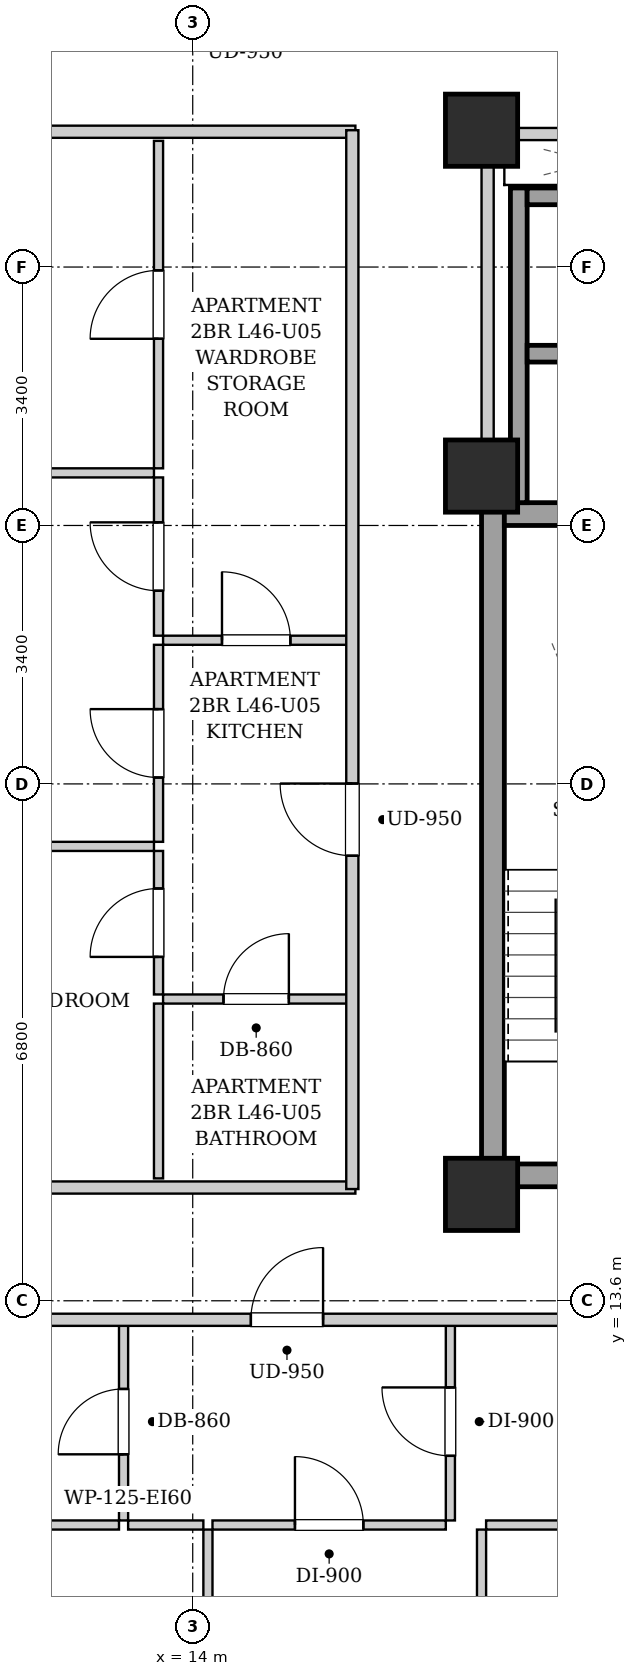
"""IFC4 building model, lengths in metres.
Left out: names, types, materials, properties, quantities, classifications, styles, units other than length and angle.
Written with IfcOpenShell. Run it as: python <this file> out.ifc"""

import sys

from ifc_helpers import new_model, si_unit, direction, frame, frame_2d, origin, origin_2d, place, context, subcontext, project, spatial, rectangle, extrude, element, fill, save


model = new_model("IFC4")
c1 = context("Model", 3, precision=1e-05, world=origin(), true_north=direction((0.0, 1.0)))
c2 = subcontext(c1, "Body", "Model", "MODEL_VIEW")
j1 = project(units=[si_unit("LENGTHUNIT", "METRE"), si_unit("PLANEANGLEUNIT", "RADIAN")], contexts=[c1])
p1 = place(None, origin())
s1 = spatial("IfcSite", under=j1, at=p1, CompositionType="ELEMENT")
p2 = place(p1, origin())
s2 = spatial("IfcBuilding", under=s1, at=p2, CompositionType="ELEMENT")
p3 = place(p2, frame((0.0, 0.0, 160.15)))
s3 = spatial("IfcBuildingStorey", under=s2, at=p3, CompositionType="ELEMENT", Elevation=160.15)
for number, where, z_axis, x_axis in (
    (1, (17.8, 15.0, 0.0), (0.0, 0.0, 1.0), (1.0, 0.0, 0.0)),
    (2, (17.8, 29.0, 0.0), (0.0, 0.0, 1.0), (1.0, 0.0, 0.0)),
    (3, (17.8, 24.45, 0.0), (0.0, 0.0, 1.0), (1.0, 0.0, 0.0)),
):
    element("IfcColumn", number, at=place(p3, frame(where, z_axis=z_axis, x_axis=x_axis)), inside=s3, PredefinedType="COLUMN", context=c2, shape_type="SweptSolid", body=[
        extrude(rectangle(XDim=0.95, YDim=0.95, at=origin_2d()), origin(), (0.0, 0.0, 1.0), 3.25),
    ])
p4 = place(p3, frame((17.95, 15.1, 0.0), z_axis=(0.0, 0.0, 1.0), x_axis=(0.0, 1.0, 0.0)))
e4 = element("IfcWall", 4, at=p4, inside=s3, PredefinedType="SHEAR", context=c2, shape_type="SweptSolid", body=[
    extrude(rectangle(XDim=9.0, YDim=0.3, at=frame_2d((4.5, 0.0))), origin(), (0.0, 0.0, 1.0), 2.99),
])
p5 = place(p3, frame((18.1, 23.95, 0.0), z_axis=(0.0, 0.0, 1.0), x_axis=(1.0, 0.0, 0.0)))
e5 = element("IfcWall", 5, at=p5, inside=s3, PredefinedType="SHEAR", context=c2, shape_type="SweptSolid", body=[
    extrude(rectangle(XDim=2.85, YDim=0.3, at=frame_2d((1.425, 0.0))), origin(), (0.0, 0.0, 1.0), 2.99),
])
p6 = place(p3, frame((18.1, 15.25, 0.0), z_axis=(0.0, 0.0, 1.0), x_axis=(1.0, 0.0, 0.0)))
e6 = element("IfcWall", 6, at=p6, inside=s3, PredefinedType="SHEAR", context=c2, shape_type="SweptSolid", body=[
    extrude(rectangle(XDim=2.85, YDim=0.3, at=frame_2d((1.425, 0.0))), origin(), (0.0, 0.0, 1.0), 2.99),
])
p7 = place(p6, frame((0.86, 0.0, 0.0)))
e7 = element("IfcOpeningElement", 7, at=p7, cuts=e6, PredefinedType="OPENING", context=c2, shape_type="SweptSolid", body=[
    extrude(rectangle(XDim=1.1, YDim=2.05, at=frame_2d((0.55, 1.025))), frame((0.0, 0.16, 0.0), z_axis=(0.0, -1.0, 0.0), x_axis=(1.0, 0.0, 0.0)), (0.0, 0.0, 1.0), 0.32),
])
p8 = place(p3, frame((18.29, 24.1, 0.0), z_axis=(0.0, 0.0, 1.0), x_axis=(0.0, 1.0, 0.0)))
e8 = element("IfcWall", 8, at=p8, inside=s3, PredefinedType="SHEAR", context=c2, shape_type="SweptSolid", body=[
    extrude(rectangle(XDim=4.14, YDim=0.22, at=frame_2d((2.07, 0.0))), origin(), (0.0, 0.0, 1.0), 2.99),
])
for number, where, z_axis, x_axis in (
    (9, (18.4, 26.06, 0.0), (0.0, 0.0, 1.0), (1.0, 0.0, 0.0)),
    (10, (18.4, 28.13, 0.0), (0.0, 0.0, 1.0), (1.0, 0.0, 0.0)),
):
    element("IfcWall", number, at=place(p3, frame(where, z_axis=z_axis, x_axis=x_axis)), inside=s3, PredefinedType="SHEAR", context=c2, shape_type="SweptSolid", body=[
        extrude(rectangle(XDim=1.9, YDim=0.22, at=frame_2d((0.95, 0.0))), origin(), (0.0, 0.0, 1.0), 2.99),
    ])
p9 = place(p3, frame((17.88, 24.12, 0.0), z_axis=(0.0, 0.0, 1.0), x_axis=(0.0, 1.0, 0.0)))
e11 = element("IfcWall", 11, at=p9, inside=s3, PredefinedType="PARTITIONING", context=c2, shape_type="SweptSolid", body=[
    extrude(rectangle(XDim=4.76, YDim=0.16, at=frame_2d((2.38, 0.0))), origin(), (0.0, 0.0, 1.0), 2.99),
])
p10 = place(p3, frame((17.96, 28.95, 0.0), z_axis=(0.0, 0.0, 1.0), x_axis=(1.0, 0.0, 0.0)))
e12 = element("IfcWall", 12, at=p10, inside=s3, PredefinedType="PARTITIONING", context=c2, shape_type="SweptSolid", body=[
    extrude(rectangle(XDim=4.29, YDim=0.16, at=frame_2d((2.145, 0.0))), origin(), (0.0, 0.0, 1.0), 2.442),
])
p11 = place(p10, frame((1.695, 0.0, 0.0)))
e13 = element("IfcOpeningElement", 13, at=p11, cuts=e12, PredefinedType="OPENING", context=c2, shape_type="SweptSolid", body=[
    extrude(rectangle(XDim=0.86, YDim=2.05, at=frame_2d((0.43, 1.025))), frame((0.0, 0.09, 0.0), z_axis=(0.0, -1.0, 0.0), x_axis=(1.0, 0.0, 0.0)), (0.0, 0.0, 1.0), 0.18),
])
for number, where, z_axis, x_axis in (
    (14, (7.78, 15.09, 0.0), (0.0, 0.0, 1.0), (1.0, 0.0, 0.0)),
    (15, (7.78, 28.98, 0.0), (0.0, 0.0, 1.0), (1.0, 0.0, 0.0)),
):
    element("IfcWall", number, at=place(p3, frame(where, z_axis=z_axis, x_axis=x_axis)), inside=s3, PredefinedType="PARTITIONING", context=c2, shape_type="SweptSolid", body=[
        extrude(rectangle(XDim=8.36, YDim=0.16, at=frame_2d((4.18, 0.0))), origin(), (0.0, 0.0, 1.0), 2.442),
    ])
p12 = place(p3, frame((13.09, 10.71, 0.0), z_axis=(0.0, 0.0, 1.0), x_axis=(0.0, 1.0, 0.0)))
e16 = element("IfcWall", 16, at=p12, inside=s3, PredefinedType="PARTITIONING", context=c2, shape_type="SweptSolid", body=[
    extrude(rectangle(XDim=2.6, YDim=0.12, at=frame_2d((1.3, 0.0))), origin(), (0.0, 0.0, 1.0), 2.99),
])
p13 = place(p12, frame((0.87, 0.0, 0.0)))
e17 = element("IfcOpeningElement", 17, at=p13, cuts=e16, PredefinedType="OPENING", context=c2, shape_type="SweptSolid", body=[
    extrude(rectangle(XDim=0.86, YDim=2.05, at=frame_2d((0.43, 1.025))), frame((0.0, 0.07, 0.0), z_axis=(0.0, -1.0, 0.0), x_axis=(1.0, 0.0, 0.0)), (0.0, 0.0, 1.0), 0.14),
])
p14 = place(p3, frame((10.63, 10.65, 0.0), z_axis=(0.0, 0.0, 1.0), x_axis=(1.0, 0.0, 0.0)))
e18 = element("IfcWall", 18, at=p14, inside=s3, PredefinedType="PARTITIONING", context=c2, shape_type="SweptSolid", body=[
    extrude(rectangle(XDim=2.4, YDim=0.12, at=frame_2d((1.2, 0.0))), origin(), (0.0, 0.0, 1.0), 2.99),
])
p15 = place(p3, frame((17.39, 10.71, 0.0), z_axis=(0.0, 0.0, 1.0), x_axis=(0.0, 1.0, 0.0)))
e19 = element("IfcWall", 19, at=p15, inside=s3, PredefinedType="PARTITIONING", context=c2, shape_type="SweptSolid", body=[
    extrude(rectangle(XDim=2.6, YDim=0.12, at=frame_2d((1.3, 0.0))), origin(), (0.0, 0.0, 1.0), 2.99),
])
p16 = place(p15, frame((0.85, 0.0, 0.0)))
e20 = element("IfcOpeningElement", 20, at=p16, cuts=e19, PredefinedType="OPENING", context=c2, shape_type="SweptSolid", body=[
    extrude(rectangle(XDim=0.9, YDim=2.05, at=frame_2d((0.45, 1.025))), frame((0.0, 0.07, 0.0), z_axis=(0.0, -1.0, 0.0), x_axis=(1.0, 0.0, 0.0)), (0.0, 0.0, 1.0), 0.14),
])
p17 = place(p3, frame((13.15, 10.65, 0.0), z_axis=(0.0, 0.0, 1.0), x_axis=(1.0, 0.0, 0.0)))
e21 = element("IfcWall", 21, at=p17, inside=s3, PredefinedType="PARTITIONING", context=c2, shape_type="SweptSolid", body=[
    extrude(rectangle(XDim=0.99, YDim=0.12, at=frame_2d((0.495, 0.0))), origin(), (0.0, 0.0, 1.0), 2.99),
])
p18 = place(p3, frame((14.26, 10.65, 0.0), z_axis=(0.0, 0.0, 1.0), x_axis=(1.0, 0.0, 0.0)))
e22 = element("IfcWall", 22, at=p18, inside=s3, PredefinedType="PARTITIONING", context=c2, shape_type="SweptSolid", body=[
    extrude(rectangle(XDim=3.07, YDim=0.12, at=frame_2d((1.535, 0.0))), origin(), (0.0, 0.0, 1.0), 2.99),
])
p19 = place(p18, frame((1.085, 0.0, 0.0)))
e23 = element("IfcOpeningElement", 23, at=p19, cuts=e22, PredefinedType="OPENING", context=c2, shape_type="SweptSolid", body=[
    extrude(rectangle(XDim=0.9, YDim=2.05, at=frame_2d((0.45, 1.025))), frame((0.0, 0.07, 0.0), z_axis=(0.0, -1.0, 0.0), x_axis=(1.0, 0.0, 0.0)), (0.0, 0.0, 1.0), 0.14),
])
p20 = place(p3, frame((17.86, 10.65, 0.0), z_axis=(0.0, 0.0, 1.0), x_axis=(1.0, 0.0, 0.0)))
e24 = element("IfcWall", 24, at=p20, inside=s3, PredefinedType="PARTITIONING", context=c2, shape_type="SweptSolid", body=[
    extrude(rectangle(XDim=3.948, YDim=0.12, at=frame_2d((1.974, 0.0))), origin(), (0.0, 0.0, 1.0), 2.99),
])
p21 = place(p20, frame((1.524, 0.0, 0.0)))
e25 = element("IfcOpeningElement", 25, at=p21, cuts=e24, PredefinedType="OPENING", context=c2, shape_type="SweptSolid", body=[
    extrude(rectangle(XDim=0.9, YDim=2.05, at=frame_2d((0.45, 1.025))), frame((0.0, 0.07, 0.0), z_axis=(0.0, -1.0, 0.0), x_axis=(1.0, 0.0, 0.0)), (0.0, 0.0, 1.0), 0.14),
])
p22 = place(p3, frame((14.2, 6.23, 0.0), z_axis=(0.0, 0.0, 1.0), x_axis=(0.0, 1.0, 0.0)))
e26 = element("IfcWall", 26, at=p22, inside=s3, PredefinedType="PARTITIONING", context=c2, shape_type="SweptSolid", body=[
    extrude(rectangle(XDim=4.36, YDim=0.12, at=frame_2d((2.18, 0.0))), origin(), (0.0, 0.0, 1.0), 2.99),
])
p23 = place(p22, frame((1.73, 0.0, 0.0)))
e27 = element("IfcOpeningElement", 27, at=p23, cuts=e26, PredefinedType="OPENING", context=c2, shape_type="SweptSolid", body=[
    extrude(rectangle(XDim=0.9, YDim=2.05, at=frame_2d((0.45, 1.025))), frame((0.0, 0.07, 0.0), z_axis=(0.0, -1.0, 0.0), x_axis=(1.0, 0.0, 0.0)), (0.0, 0.0, 1.0), 0.14),
])
p24 = place(p3, frame((17.8, 4.08, 0.0), z_axis=(0.0, 0.0, 1.0), x_axis=(0.0, 1.0, 0.0)))
e28 = element("IfcWall", 28, at=p24, inside=s3, PredefinedType="PARTITIONING", context=c2, shape_type="SweptSolid", body=[
    extrude(rectangle(XDim=6.51, YDim=0.12, at=frame_2d((3.255, 0.0))), origin(), (0.0, 0.0, 1.0), 2.442),
])
p25 = place(p24, frame((2.79, 0.0, 0.0)))
e29 = element("IfcOpeningElement", 29, at=p25, cuts=e28, PredefinedType="OPENING", context=c2, shape_type="SweptSolid", body=[
    extrude(rectangle(XDim=0.9, YDim=2.05, at=frame_2d((0.45, 1.025))), frame((0.0, 0.07, 0.0), z_axis=(0.0, -1.0, 0.0), x_axis=(1.0, 0.0, 0.0)), (0.0, 0.0, 1.0), 0.14),
])
p26 = place(p3, frame((13.61, 22.29, 0.0), z_axis=(0.0, 0.0, 1.0), x_axis=(1.0, 0.0, 0.0)))
e30 = element("IfcWall", 30, at=p26, inside=s3, PredefinedType="PARTITIONING", context=c2, shape_type="SweptSolid", body=[
    extrude(rectangle(XDim=2.45, YDim=0.12, at=frame_2d((1.225, 0.0))), origin(), (0.0, 0.0, 1.0), 2.99),
])
p27 = place(p26, frame((0.775, 0.0, 0.0)))
e31 = element("IfcOpeningElement", 31, at=p27, cuts=e30, PredefinedType="OPENING", context=c2, shape_type="SweptSolid", body=[
    extrude(rectangle(XDim=0.9, YDim=2.05, at=frame_2d((0.45, 1.025))), frame((0.0, 0.07, 0.0), z_axis=(0.0, -1.0, 0.0), x_axis=(1.0, 0.0, 0.0)), (0.0, 0.0, 1.0), 0.14),
])
p28 = place(p3, frame((13.55, 22.35, 0.0), z_axis=(0.0, 0.0, 1.0), x_axis=(0.0, 1.0, 0.0)))
e32 = element("IfcWall", 32, at=p28, inside=s3, PredefinedType="PARTITIONING", context=c2, shape_type="SweptSolid", body=[
    extrude(rectangle(XDim=2.082, YDim=0.12, at=frame_2d((1.041, 0.0))), origin(), (0.0, 0.0, 1.0), 2.99),
])
p29 = place(p28, frame((0.591, 0.0, 0.0)))
e33 = element("IfcOpeningElement", 33, at=p29, cuts=e32, PredefinedType="OPENING", context=c2, shape_type="SweptSolid", body=[
    extrude(rectangle(XDim=0.9, YDim=2.05, at=frame_2d((0.45, 1.025))), frame((0.0, 0.07, 0.0), z_axis=(0.0, -1.0, 0.0), x_axis=(1.0, 0.0, 0.0)), (0.0, 0.0, 1.0), 0.14),
])
p30 = place(p3, frame((13.55, 24.552, 0.0), z_axis=(0.0, 0.0, 1.0), x_axis=(0.0, 1.0, 0.0)))
e34 = element("IfcWall", 34, at=p30, inside=s3, PredefinedType="PARTITIONING", context=c2, shape_type="SweptSolid", body=[
    extrude(rectangle(XDim=4.308, YDim=0.12, at=frame_2d((2.154, 0.0))), origin(), (0.0, 0.0, 1.0), 2.99),
])
p31 = place(p30, frame((1.704, 0.0, 0.0)))
e35 = element("IfcOpeningElement", 35, at=p31, cuts=e34, PredefinedType="OPENING", context=c2, shape_type="SweptSolid", body=[
    extrude(rectangle(XDim=0.9, YDim=2.05, at=frame_2d((0.45, 1.025))), frame((0.0, 0.07, 0.0), z_axis=(0.0, -1.0, 0.0), x_axis=(1.0, 0.0, 0.0)), (0.0, 0.0, 1.0), 0.14),
])
p32 = place(p3, frame((13.61, 17.57, 0.0), z_axis=(0.0, 0.0, 1.0), x_axis=(1.0, 0.0, 0.0)))
e36 = element("IfcWall", 36, at=p32, inside=s3, PredefinedType="PARTITIONING", context=c2, shape_type="SweptSolid", body=[
    extrude(rectangle(XDim=2.45, YDim=0.12, at=frame_2d((1.225, 0.0))), origin(), (0.0, 0.0, 1.0), 2.99),
])
p33 = place(p32, frame((0.795, 0.0, 0.0)))
e37 = element("IfcOpeningElement", 37, at=p33, cuts=e36, PredefinedType="OPENING", context=c2, shape_type="SweptSolid", body=[
    extrude(rectangle(XDim=0.86, YDim=2.05, at=frame_2d((0.43, 1.025))), frame((0.0, 0.07, 0.0), z_axis=(0.0, -1.0, 0.0), x_axis=(1.0, 0.0, 0.0)), (0.0, 0.0, 1.0), 0.14),
])
p34 = place(p3, frame((13.55, 15.21, 0.0), z_axis=(0.0, 0.0, 1.0), x_axis=(0.0, 1.0, 0.0)))
e38 = element("IfcWall", 38, at=p34, inside=s3, PredefinedType="PARTITIONING", context=c2, shape_type="SweptSolid", body=[
    extrude(rectangle(XDim=2.3, YDim=0.12, at=frame_2d((1.15, 0.0))), origin(), (0.0, 0.0, 1.0), 2.99),
])
p35 = place(p3, frame((13.55, 17.63, 0.0), z_axis=(0.0, 0.0, 1.0), x_axis=(0.0, 1.0, 0.0)))
e39 = element("IfcWall", 39, at=p35, inside=s3, PredefinedType="PARTITIONING", context=c2, shape_type="SweptSolid", body=[
    extrude(rectangle(XDim=1.888, YDim=0.12, at=frame_2d((0.944, 0.0))), origin(), (0.0, 0.0, 1.0), 2.99),
])
p36 = place(p35, frame((0.494, 0.0, 0.0)))
e40 = element("IfcOpeningElement", 40, at=p36, cuts=e39, PredefinedType="OPENING", context=c2, shape_type="SweptSolid", body=[
    extrude(rectangle(XDim=0.9, YDim=2.05, at=frame_2d((0.45, 1.025))), frame((0.0, 0.07, 0.0), z_axis=(0.0, -1.0, 0.0), x_axis=(1.0, 0.0, 0.0)), (0.0, 0.0, 1.0), 0.14),
])
p37 = place(p3, frame((13.55, 19.638, 0.0), z_axis=(0.0, 0.0, 1.0), x_axis=(0.0, 1.0, 0.0)))
e41 = element("IfcWall", 41, at=p37, inside=s3, PredefinedType="PARTITIONING", context=c2, shape_type="SweptSolid", body=[
    extrude(rectangle(XDim=2.592, YDim=0.12, at=frame_2d((1.296, 0.0))), origin(), (0.0, 0.0, 1.0), 2.99),
])
p38 = place(p37, frame((0.846, 0.0, 0.0)))
e42 = element("IfcOpeningElement", 42, at=p38, cuts=e41, PredefinedType="OPENING", context=c2, shape_type="SweptSolid", body=[
    extrude(rectangle(XDim=0.9, YDim=2.05, at=frame_2d((0.45, 1.025))), frame((0.0, 0.07, 0.0), z_axis=(0.0, -1.0, 0.0), x_axis=(1.0, 0.0, 0.0)), (0.0, 0.0, 1.0), 0.14),
])
p39 = place(p3, frame((7.78, 19.578, 0.0), z_axis=(0.0, 0.0, 1.0), x_axis=(1.0, 0.0, 0.0)))
e43 = element("IfcWall", 43, at=p39, inside=s3, PredefinedType="PARTITIONING", context=c2, shape_type="SweptSolid", body=[
    extrude(rectangle(XDim=5.71, YDim=0.12, at=frame_2d((2.855, 0.0))), origin(), (0.0, 0.0, 1.0), 2.99),
])
p40 = place(p39, frame((2.39, 0.0, 0.0)))
e44 = element("IfcOpeningElement", 44, at=p40, cuts=e43, PredefinedType="OPENING", context=c2, shape_type="SweptSolid", body=[
    extrude(rectangle(XDim=0.9, YDim=2.05, at=frame_2d((0.45, 1.025))), frame((0.0, 0.07, 0.0), z_axis=(0.0, -1.0, 0.0), x_axis=(1.0, 0.0, 0.0)), (0.0, 0.0, 1.0), 0.14),
])
p41 = place(p3, frame((7.78, 24.492, 0.0), z_axis=(0.0, 0.0, 1.0), x_axis=(1.0, 0.0, 0.0)))
e45 = element("IfcWall", 45, at=p41, inside=s3, PredefinedType="PARTITIONING", context=c2, shape_type="SweptSolid", body=[
    extrude(rectangle(XDim=5.71, YDim=0.12, at=frame_2d((2.855, 0.0))), origin(), (0.0, 0.0, 1.0), 2.621),
])
p42 = place(p41, frame((2.39, 0.0, 0.0)))
e46 = element("IfcOpeningElement", 46, at=p42, cuts=e45, PredefinedType="OPENING", context=c2, shape_type="SweptSolid", body=[
    extrude(rectangle(XDim=0.9, YDim=2.05, at=frame_2d((0.45, 1.025))), frame((0.0, 0.07, 0.0), z_axis=(0.0, -1.0, 0.0), x_axis=(1.0, 0.0, 0.0)), (0.0, 0.0, 1.0), 0.14),
])
p43 = place(p3, frame((10.05, 13.35, 0.0), z_axis=(0.0, 0.0, 1.0), x_axis=(1.0, 0.0, 0.0)))
e47 = element("IfcWall", 47, at=p43, inside=s3, PredefinedType="PARTITIONING", context=c2, shape_type="SweptSolid", body=[
    extrude(rectangle(XDim=27.7, YDim=0.16, at=frame_2d((13.85, 0.0))), origin(), (0.0, 0.0, 1.0), 2.99),
])
p44 = place(p43, frame((4.715, 0.0, 0.0)))
e48 = element("IfcOpeningElement", 48, at=p44, cuts=e47, PredefinedType="OPENING", context=c2, shape_type="SweptSolid", body=[
    extrude(rectangle(XDim=0.95, YDim=2.1, at=frame_2d((0.475, 1.05))), frame((0.0, 0.09, 0.0), z_axis=(0.0, -1.0, 0.0), x_axis=(1.0, 0.0, 0.0)), (0.0, 0.0, 1.0), 0.18),
])
p45 = place(p43, frame((15.365, 0.0, 0.0)))
e49 = element("IfcOpeningElement", 49, at=p45, cuts=e47, PredefinedType="OPENING", context=c2, shape_type="SweptSolid", body=[
    extrude(rectangle(XDim=0.95, YDim=2.1, at=frame_2d((0.475, 1.05))), frame((0.0, 0.09, 0.0), z_axis=(0.0, -1.0, 0.0), x_axis=(1.0, 0.0, 0.0)), (0.0, 0.0, 1.0), 0.18),
])
p46 = place(p43, frame((21.565, 0.0, 0.0)))
e50 = element("IfcOpeningElement", 50, at=p46, cuts=e47, PredefinedType="OPENING", context=c2, shape_type="SweptSolid", body=[
    extrude(rectangle(XDim=0.95, YDim=2.1, at=frame_2d((0.475, 1.05))), frame((0.0, 0.09, 0.0), z_axis=(0.0, -1.0, 0.0), x_axis=(1.0, 0.0, 0.0)), (0.0, 0.0, 1.0), 0.18),
])
p47 = place(p3, frame((16.1, 15.07, 0.0), z_axis=(0.0, 0.0, 1.0), x_axis=(0.0, 1.0, 0.0)))
e51 = element("IfcWall", 51, at=p47, inside=s3, PredefinedType="PARTITIONING", context=c2, shape_type="SweptSolid", body=[
    extrude(rectangle(XDim=13.93, YDim=0.16, at=frame_2d((6.965, 0.0))), origin(), (0.0, 0.0, 1.0), 2.99),
])
p48 = place(p47, frame((4.385, 0.0, 0.0)))
e52 = element("IfcOpeningElement", 52, at=p48, cuts=e51, PredefinedType="OPENING", context=c2, shape_type="SweptSolid", body=[
    extrude(rectangle(XDim=0.95, YDim=2.1, at=frame_2d((0.475, 1.05))), frame((0.0, 0.09, 0.0), z_axis=(0.0, -1.0, 0.0), x_axis=(1.0, 0.0, 0.0)), (0.0, 0.0, 1.0), 0.18),
])
p49 = place(p13, origin())
e53 = element("IfcDoor", 53, at=p49, inside=s3, OperationType="SINGLE_SWING_LEFT", PredefinedType="DOOR", context=c2, shape_type="SweptSolid", body=[
    extrude(rectangle(XDim=0.86, YDim=2.05, at=frame_2d((0.43, 1.025))), frame((0.0, 0.025, 0.0), z_axis=(0.0, -1.0, 0.0), x_axis=(1.0, 0.0, 0.0)), (0.0, 0.0, 1.0), 0.05),
])
fill(e17, e53)
p50 = place(p16, origin())
e54 = element("IfcDoor", 54, at=p50, inside=s3, OperationType="SINGLE_SWING_RIGHT", PredefinedType="DOOR", context=c2, shape_type="SweptSolid", body=[
    extrude(rectangle(XDim=0.9, YDim=2.05, at=frame_2d((0.45, 1.025))), frame((0.0, 0.025, 0.0), z_axis=(0.0, -1.0, 0.0), x_axis=(1.0, 0.0, 0.0)), (0.0, 0.0, 1.0), 0.05),
])
fill(e20, e54)
p51 = place(p19, origin())
e55 = element("IfcDoor", 55, at=p51, inside=s3, OperationType="SINGLE_SWING_LEFT", PredefinedType="DOOR", context=c2, shape_type="SweptSolid", body=[
    extrude(rectangle(XDim=0.9, YDim=2.05, at=frame_2d((0.45, 1.025))), frame((0.0, 0.025, 0.0), z_axis=(0.0, -1.0, 0.0), x_axis=(1.0, 0.0, 0.0)), (0.0, 0.0, 1.0), 0.05),
])
fill(e23, e55)
p52 = place(p27, origin())
e56 = element("IfcDoor", 56, at=p52, inside=s3, OperationType="SINGLE_SWING_LEFT", PredefinedType="DOOR", context=c2, shape_type="SweptSolid", body=[
    extrude(rectangle(XDim=0.9, YDim=2.05, at=frame_2d((0.45, 1.025))), frame((0.0, 0.025, 0.0), z_axis=(0.0, -1.0, 0.0), x_axis=(1.0, 0.0, 0.0)), (0.0, 0.0, 1.0), 0.05),
])
fill(e31, e56)
p53 = place(p29, origin())
e57 = element("IfcDoor", 57, at=p53, inside=s3, OperationType="SINGLE_SWING_RIGHT", PredefinedType="DOOR", context=c2, shape_type="SweptSolid", body=[
    extrude(rectangle(XDim=0.9, YDim=2.05, at=frame_2d((0.45, 1.025))), frame((0.0, 0.025, 0.0), z_axis=(0.0, -1.0, 0.0), x_axis=(1.0, 0.0, 0.0)), (0.0, 0.0, 1.0), 0.05),
])
fill(e33, e57)
p54 = place(p31, origin())
e58 = element("IfcDoor", 58, at=p54, inside=s3, OperationType="SINGLE_SWING_LEFT", PredefinedType="DOOR", context=c2, shape_type="SweptSolid", body=[
    extrude(rectangle(XDim=0.9, YDim=2.05, at=frame_2d((0.45, 1.025))), frame((0.0, 0.025, 0.0), z_axis=(0.0, -1.0, 0.0), x_axis=(1.0, 0.0, 0.0)), (0.0, 0.0, 1.0), 0.05),
])
fill(e35, e58)
p55 = place(p33, origin())
e59 = element("IfcDoor", 59, at=p55, inside=s3, OperationType="SINGLE_SWING_RIGHT", PredefinedType="DOOR", context=c2, shape_type="SweptSolid", body=[
    extrude(rectangle(XDim=0.86, YDim=2.05, at=frame_2d((0.43, 1.025))), frame((0.0, 0.025, 0.0), z_axis=(0.0, -1.0, 0.0), x_axis=(1.0, 0.0, 0.0)), (0.0, 0.0, 1.0), 0.05),
])
fill(e37, e59)
p56 = place(p36, origin())
e60 = element("IfcDoor", 60, at=p56, inside=s3, OperationType="SINGLE_SWING_LEFT", PredefinedType="DOOR", context=c2, shape_type="SweptSolid", body=[
    extrude(rectangle(XDim=0.9, YDim=2.05, at=frame_2d((0.45, 1.025))), frame((0.0, 0.025, 0.0), z_axis=(0.0, -1.0, 0.0), x_axis=(1.0, 0.0, 0.0)), (0.0, 0.0, 1.0), 0.05),
])
fill(e40, e60)
p57 = place(p38, origin())
e61 = element("IfcDoor", 61, at=p57, inside=s3, OperationType="SINGLE_SWING_RIGHT", PredefinedType="DOOR", context=c2, shape_type="SweptSolid", body=[
    extrude(rectangle(XDim=0.9, YDim=2.05, at=frame_2d((0.45, 1.025))), frame((0.0, 0.025, 0.0), z_axis=(0.0, -1.0, 0.0), x_axis=(1.0, 0.0, 0.0)), (0.0, 0.0, 1.0), 0.05),
])
fill(e42, e61)
p58 = place(p44, origin())
e62 = element("IfcDoor", 62, at=p58, inside=s3, OperationType="SINGLE_SWING_RIGHT", PredefinedType="DOOR", context=c2, shape_type="SweptSolid", body=[
    extrude(rectangle(XDim=0.95, YDim=2.1, at=frame_2d((0.475, 1.05))), frame((0.0, 0.025, 0.0), z_axis=(0.0, -1.0, 0.0), x_axis=(1.0, 0.0, 0.0)), (0.0, 0.0, 1.0), 0.05),
])
fill(e48, e62)
p59 = place(p48, origin())
e63 = element("IfcDoor", 63, at=p59, inside=s3, OperationType="SINGLE_SWING_RIGHT", PredefinedType="DOOR", context=c2, shape_type="SweptSolid", body=[
    extrude(rectangle(XDim=0.95, YDim=2.1, at=frame_2d((0.475, 1.05))), frame((0.0, 0.025, 0.0), z_axis=(0.0, -1.0, 0.0), x_axis=(1.0, 0.0, 0.0)), (0.0, 0.0, 1.0), 0.05),
])
fill(e52, e63)
save(model, sys.argv[1])
